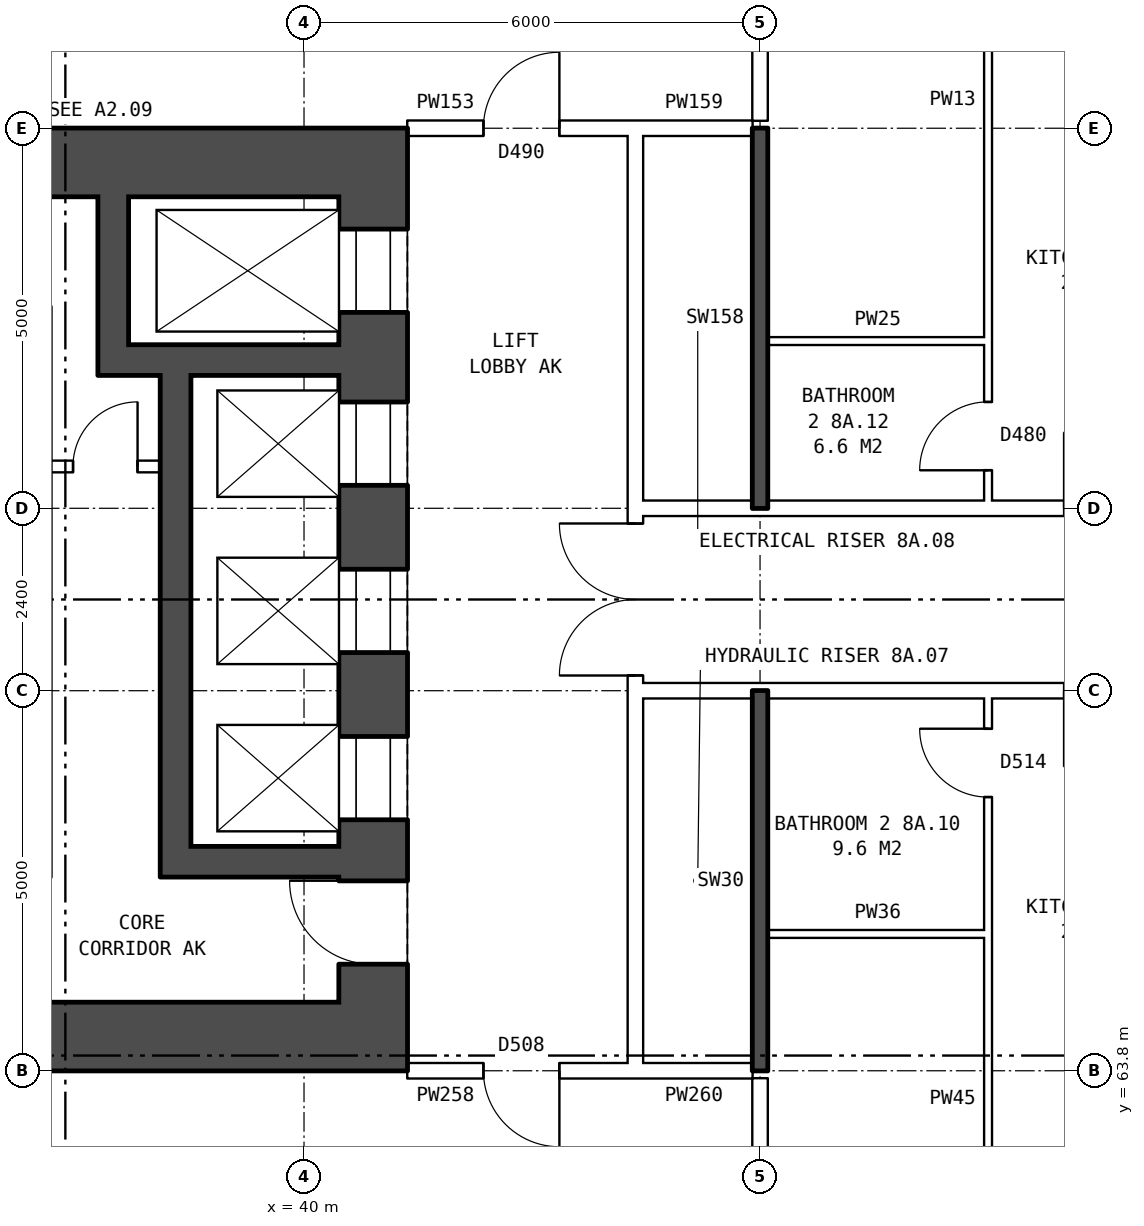
"""IFC4 building model, lengths in metres.
Left out: names, types, materials, properties, quantities, classifications, styles, units other than length and angle.
Written with IfcOpenShell. Run it as: python <this file> out.ifc"""

import sys

from ifc_helpers import new_model, si_unit, direction, frame, frame_2d, origin, place, context, subcontext, project, spatial, rectangle, extrude, element, fill, save


model = new_model("IFC4")
c1 = context("Model", 3, precision=1e-05, world=origin(), true_north=direction((0.0, 1.0)))
c2 = subcontext(c1, "Body", "Model", "MODEL_VIEW")
j1 = project(units=[si_unit("LENGTHUNIT", "METRE"), si_unit("PLANEANGLEUNIT", "RADIAN")], contexts=[c1])
p1 = place(None, origin())
s1 = spatial("IfcSite", under=j1, at=p1, CompositionType="ELEMENT")
p2 = place(p1, origin())
s2 = spatial("IfcBuilding", under=s1, at=p2, CompositionType="ELEMENT")
p3 = place(p2, frame((0.0, 0.0, 31.9)))
s3 = spatial("IfcBuildingStorey", under=s2, at=p3, CompositionType="ELEMENT", Elevation=31.9)
p4 = place(p3, frame((40.91, 75.3, 0.0), z_axis=(0.0, 0.0, 1.0), x_axis=(0.0, -1.0, 0.0)))
e1 = element("IfcWall", 1, at=p4, inside=s3, PredefinedType="SHEAR", context=c2, shape_type="SweptSolid", body=[
    extrude(rectangle(XDim=10.6, YDim=0.9, at=frame_2d((5.3, 0.0))), origin(), (0.0, 0.0, 1.0), 2.85),
])
p5 = place(p4, frame((0.425, 0.0, 0.0)))
e2 = element("IfcOpeningElement", 2, at=p5, cuts=e1, PredefinedType="OPENING", context=c2, shape_type="SweptSolid", body=[
    extrude(rectangle(XDim=1.1, YDim=2.1, at=frame_2d((0.55, 1.05))), frame((0.0, 0.46, 0.0), z_axis=(0.0, -1.0, 0.0), x_axis=(1.0, 0.0, 0.0)), (0.0, 0.0, 1.0), 0.92),
])
p6 = place(p4, frame((2.7, 0.0, 0.0)))
e3 = element("IfcOpeningElement", 3, at=p6, cuts=e1, PredefinedType="OPENING", context=c2, shape_type="SweptSolid", body=[
    extrude(rectangle(XDim=1.1, YDim=2.1, at=frame_2d((0.55, 1.05))), frame((0.0, 0.46, 0.0), z_axis=(0.0, -1.0, 0.0), x_axis=(1.0, 0.0, 0.0)), (0.0, 0.0, 1.0), 0.92),
])
p7 = place(p4, frame((4.9, 0.0, 0.0)))
e4 = element("IfcOpeningElement", 4, at=p7, cuts=e1, PredefinedType="OPENING", context=c2, shape_type="SweptSolid", body=[
    extrude(rectangle(XDim=1.1, YDim=2.1, at=frame_2d((0.55, 1.05))), frame((0.0, 0.46, 0.0), z_axis=(0.0, -1.0, 0.0), x_axis=(1.0, 0.0, 0.0)), (0.0, 0.0, 1.0), 0.92),
])
p8 = place(p4, frame((7.1, 0.0, 0.0)))
e5 = element("IfcOpeningElement", 5, at=p8, cuts=e1, PredefinedType="OPENING", context=c2, shape_type="SweptSolid", body=[
    extrude(rectangle(XDim=1.1, YDim=2.1, at=frame_2d((0.55, 1.05))), frame((0.0, 0.46, 0.0), z_axis=(0.0, -1.0, 0.0), x_axis=(1.0, 0.0, 0.0)), (0.0, 0.0, 1.0), 0.92),
])
p9 = place(p4, frame((9.0, 0.0, 0.0)))
e6 = element("IfcOpeningElement", 6, at=p9, cuts=e1, PredefinedType="OPENING", context=c2, shape_type="SweptSolid", body=[
    extrude(rectangle(XDim=1.1, YDim=2.1, at=frame_2d((0.55, 1.05))), frame((0.0, 0.46, 0.0), z_axis=(0.0, -1.0, 0.0), x_axis=(1.0, 0.0, 0.0)), (0.0, 0.0, 1.0), 0.92),
])
for number, where, z_axis, x_axis in (
    (7, (41.36, 75.75, 0.0), (0.0, 0.0, 1.0), (-1.0, 0.0, 0.0)),
    (8, (41.36, 64.25, 0.0), (0.0, 0.0, 1.0), (-1.0, 0.0, 0.0)),
):
    element("IfcWall", number, at=place(p3, frame(where, z_axis=z_axis, x_axis=x_axis)), inside=s3, PredefinedType="SHEAR", context=c2, shape_type="SweptSolid", body=[
        extrude(rectangle(XDim=9.0, YDim=0.9, at=frame_2d((4.5, 0.0))), origin(), (0.0, 0.0, 1.0), 2.85),
    ])
p10 = place(p3, frame((40.46, 73.15, 0.0), z_axis=(0.0, 0.0, 1.0), x_axis=(-1.0, 0.0, 0.0)))
e9 = element("IfcWall", 9, at=p10, inside=s3, PredefinedType="SHEAR", context=c2, shape_type="SweptSolid", body=[
    extrude(rectangle(XDim=3.17, YDim=0.4, at=frame_2d((1.585, 0.0))), origin(), (0.0, 0.0, 1.0), 2.85),
])
p11 = place(p3, frame((38.11, 71.75, 0.0), z_axis=(0.0, 0.0, 1.0), x_axis=(-1.0, 0.0, 0.0)))
e10 = element("IfcWall", 10, at=p11, inside=s3, PredefinedType="PARTITIONING", context=c2, shape_type="SweptSolid", body=[
    extrude(rectangle(XDim=1.45, YDim=0.15, at=frame_2d((0.725, 0.0))), origin(), (0.0, 0.0, 1.0), 2.85),
])
p12 = place(p11, frame((0.3, 0.0, 0.0)))
e11 = element("IfcOpeningElement", 11, at=p12, cuts=e10, PredefinedType="OPENING", context=c2, shape_type="SweptSolid", body=[
    extrude(rectangle(XDim=0.85, YDim=2.1, at=frame_2d((0.425, 1.05))), frame((0.0, 0.085, 0.0), z_axis=(0.0, -1.0, 0.0), x_axis=(1.0, 0.0, 0.0)), (0.0, 0.0, 1.0), 0.17),
])
p13 = place(p3, frame((40.46, 66.55, 0.0), z_axis=(0.0, 0.0, 1.0), x_axis=(-1.0, 0.0, 0.0)))
e12 = element("IfcWall", 12, at=p13, inside=s3, PredefinedType="SHEAR", context=c2, shape_type="SweptSolid", body=[
    extrude(rectangle(XDim=1.95, YDim=0.4, at=frame_2d((0.975, 0.0))), origin(), (0.0, 0.0, 1.0), 2.85),
])
p14 = place(p3, frame((38.31, 72.95, 0.0), z_axis=(0.0, 0.0, 1.0), x_axis=(0.0, -1.0, 0.0)))
e13 = element("IfcWall", 13, at=p14, inside=s3, PredefinedType="SHEAR", context=c2, shape_type="SweptSolid", body=[
    extrude(rectangle(XDim=6.6, YDim=0.4, at=frame_2d((3.3, 0.0))), origin(), (0.0, 0.0, 1.0), 2.85),
])
p15 = place(p3, frame((37.49, 75.3, 0.0), z_axis=(0.0, 0.0, 1.0), x_axis=(0.0, -1.0, 0.0)))
e14 = element("IfcWall", 14, at=p15, inside=s3, PredefinedType="SHEAR", context=c2, shape_type="SweptSolid", body=[
    extrude(rectangle(XDim=1.95, YDim=0.4, at=frame_2d((0.975, 0.0))), origin(), (0.0, 0.0, 1.0), 2.85),
])
p16 = place(p3, frame((44.36, 63.9, 0.0), z_axis=(0.0, 0.0, 1.0), x_axis=(0.0, 1.0, 0.0)))
e15 = element("IfcWall", 15, at=p16, inside=s3, PredefinedType="PARTITIONING", context=c2, shape_type="SweptSolid", body=[
    extrude(rectangle(XDim=12.2, YDim=0.2, at=frame_2d((6.1, 0.0))), origin(), (0.0, 0.0, 1.0), 2.85),
])
p17 = place(p16, frame((5.1, 0.0, 0.0)))
e16 = element("IfcOpeningElement", 16, at=p17, cuts=e15, PredefinedType="OPENING", context=c2, shape_type="SweptSolid", body=[
    extrude(rectangle(XDim=2.0, YDim=2.1, at=frame_2d((1.0, 1.05))), frame((0.0, 0.11, 0.0), z_axis=(0.0, -1.0, 0.0), x_axis=(1.0, 0.0, 0.0)), (0.0, 0.0, 1.0), 0.22),
])
p18 = place(p3, frame((41.36, 63.8, 0.0), z_axis=(0.0, 0.0, 1.0), x_axis=(1.0, 0.0, 0.0)))
e17 = element("IfcWall", 17, at=p18, inside=s3, PredefinedType="PARTITIONING", context=c2, shape_type="SweptSolid", body=[
    extrude(rectangle(XDim=3.0, YDim=0.2, at=frame_2d((1.5, 0.0))), origin(), (0.0, 0.0, 1.0), 2.85),
])
p19 = place(p18, frame((1.0, 0.0, 0.0)))
e18 = element("IfcOpeningElement", 18, at=p19, cuts=e17, PredefinedType="OPENING", context=c2, shape_type="SweptSolid", body=[
    extrude(rectangle(XDim=1.0, YDim=2.1, at=frame_2d((0.5, 1.05))), frame((0.0, 0.11, 0.0), z_axis=(0.0, -1.0, 0.0), x_axis=(1.0, 0.0, 0.0)), (0.0, 0.0, 1.0), 0.22),
])
p20 = place(p3, frame((44.36, 63.8, 0.0), z_axis=(0.0, 0.0, 1.0), x_axis=(1.0, 0.0, 0.0)))
e19 = element("IfcWall", 19, at=p20, inside=s3, PredefinedType="PARTITIONING", context=c2, shape_type="SweptSolid", body=[
    extrude(rectangle(XDim=1.54, YDim=0.2, at=frame_2d((0.77, 0.0))), origin(), (0.0, 0.0, 1.0), 2.85),
])
p21 = place(p3, frame((46.1, 65.6, 0.0), z_axis=(0.0, 0.0, 1.0), x_axis=(1.0, 0.0, 0.0)))
e20 = element("IfcWall", 20, at=p21, inside=s3, PredefinedType="PARTITIONING", context=c2, shape_type="SweptSolid", body=[
    extrude(rectangle(XDim=2.9, YDim=0.1, at=frame_2d((1.45, 0.0))), origin(), (0.0, 0.0, 1.0), 2.85),
])
p22 = place(p3, frame((44.36, 68.8, 0.0), z_axis=(0.0, 0.0, 1.0), x_axis=(1.0, 0.0, 0.0)))
e21 = element("IfcWall", 21, at=p22, inside=s3, PredefinedType="PARTITIONING", context=c2, shape_type="SweptSolid", body=[
    extrude(rectangle(XDim=19.28, YDim=0.2, at=frame_2d((9.64, 0.0))), origin(), (0.0, 0.0, 1.0), 2.85),
])
p23 = place(p22, frame((14.64, 0.0, 0.0)))
e22 = element("IfcOpeningElement", 22, at=p23, cuts=e21, PredefinedType="OPENING", context=c2, shape_type="SweptSolid", body=[
    extrude(rectangle(XDim=1.0, YDim=2.1, at=frame_2d((0.5, 1.05))), frame((0.0, 0.11, 0.0), z_axis=(0.0, -1.0, 0.0), x_axis=(1.0, 0.0, 0.0)), (0.0, 0.0, 1.0), 0.22),
])
p24 = place(p22, frame((5.64, 0.0, 0.0)))
e23 = element("IfcOpeningElement", 23, at=p24, cuts=e21, PredefinedType="OPENING", context=c2, shape_type="SweptSolid", body=[
    extrude(rectangle(XDim=1.0, YDim=2.1, at=frame_2d((0.5, 1.05))), frame((0.0, 0.11, 0.0), z_axis=(0.0, -1.0, 0.0), x_axis=(1.0, 0.0, 0.0)), (0.0, 0.0, 1.0), 0.22),
])
p25 = place(p3, frame((44.36, 71.2, 0.0), z_axis=(0.0, 0.0, 1.0), x_axis=(1.0, 0.0, 0.0)))
e24 = element("IfcWall", 24, at=p25, inside=s3, PredefinedType="PARTITIONING", context=c2, shape_type="SweptSolid", body=[
    extrude(rectangle(XDim=19.28, YDim=0.2, at=frame_2d((9.64, 0.0))), origin(), (0.0, 0.0, 1.0), 2.85),
])
p26 = place(p25, frame((14.64, 0.0, 0.0)))
e25 = element("IfcOpeningElement", 25, at=p26, cuts=e24, PredefinedType="OPENING", context=c2, shape_type="SweptSolid", body=[
    extrude(rectangle(XDim=1.0, YDim=2.1, at=frame_2d((0.5, 1.05))), frame((0.0, 0.11, 0.0), z_axis=(0.0, -1.0, 0.0), x_axis=(1.0, 0.0, 0.0)), (0.0, 0.0, 1.0), 0.22),
])
p27 = place(p25, frame((5.64, 0.0, 0.0)))
e26 = element("IfcOpeningElement", 26, at=p27, cuts=e24, PredefinedType="OPENING", context=c2, shape_type="SweptSolid", body=[
    extrude(rectangle(XDim=1.0, YDim=2.1, at=frame_2d((0.5, 1.05))), frame((0.0, 0.11, 0.0), z_axis=(0.0, -1.0, 0.0), x_axis=(1.0, 0.0, 0.0)), (0.0, 0.0, 1.0), 0.22),
])
p28 = place(p3, frame((46.1, 73.4, 0.0), z_axis=(0.0, 0.0, 1.0), x_axis=(1.0, 0.0, 0.0)))
e27 = element("IfcWall", 27, at=p28, inside=s3, PredefinedType="PARTITIONING", context=c2, shape_type="SweptSolid", body=[
    extrude(rectangle(XDim=2.9, YDim=0.1, at=frame_2d((1.45, 0.0))), origin(), (0.0, 0.0, 1.0), 2.85),
])
p29 = place(p3, frame((41.36, 76.2, 0.0), z_axis=(0.0, 0.0, 1.0), x_axis=(1.0, 0.0, 0.0)))
e28 = element("IfcWall", 28, at=p29, inside=s3, PredefinedType="PARTITIONING", context=c2, shape_type="SweptSolid", body=[
    extrude(rectangle(XDim=3.0, YDim=0.2, at=frame_2d((1.5, 0.0))), origin(), (0.0, 0.0, 1.0), 2.85),
])
p30 = place(p29, frame((1.0, 0.0, 0.0)))
e29 = element("IfcOpeningElement", 29, at=p30, cuts=e28, PredefinedType="OPENING", context=c2, shape_type="SweptSolid", body=[
    extrude(rectangle(XDim=1.0, YDim=2.1, at=frame_2d((0.5, 1.05))), frame((0.0, 0.11, 0.0), z_axis=(0.0, -1.0, 0.0), x_axis=(1.0, 0.0, 0.0)), (0.0, 0.0, 1.0), 0.22),
])
p31 = place(p3, frame((44.36, 76.2, 0.0), z_axis=(0.0, 0.0, 1.0), x_axis=(1.0, 0.0, 0.0)))
e30 = element("IfcWall", 30, at=p31, inside=s3, PredefinedType="PARTITIONING", context=c2, shape_type="SweptSolid", body=[
    extrude(rectangle(XDim=1.54, YDim=0.2, at=frame_2d((0.77, 0.0))), origin(), (0.0, 0.0, 1.0), 2.85),
])
p32 = place(p3, frame((46.0, 61.5, 0.0), z_axis=(0.0, 0.0, 1.0), x_axis=(0.0, 1.0, 0.0)))
e31 = element("IfcWall", 31, at=p32, inside=s3, PredefinedType="PARTITIONING", context=c2, shape_type="SweptSolid", body=[
    extrude(rectangle(XDim=2.2, YDim=0.2, at=frame_2d((1.1, 0.0))), origin(), (0.0, 0.0, 1.0), 2.85),
])
for number, where, z_axis, x_axis in (
    (32, (46.0, 63.8, 0.0), (0.0, 0.0, 1.0), (0.0, 1.0, 0.0)),
    (33, (46.0, 71.2, 0.0), (0.0, 0.0, 1.0), (0.0, 1.0, 0.0)),
):
    element("IfcWall", number, at=place(p3, frame(where, z_axis=z_axis, x_axis=x_axis)), inside=s3, PredefinedType="SOLIDWALL", context=c2, shape_type="SweptSolid", body=[
        extrude(rectangle(XDim=5.0, YDim=0.2, at=frame_2d((2.5, 0.0))), origin(), (0.0, 0.0, 1.0), 2.85),
    ])
p33 = place(p3, frame((46.0, 76.3, 0.0), z_axis=(0.0, 0.0, 1.0), x_axis=(0.0, 1.0, 0.0)))
e34 = element("IfcWall", 34, at=p33, inside=s3, PredefinedType="PARTITIONING", context=c2, shape_type="SweptSolid", body=[
    extrude(rectangle(XDim=2.2, YDim=0.2, at=frame_2d((1.1, 0.0))), origin(), (0.0, 0.0, 1.0), 2.85),
])
p34 = place(p3, frame((49.0, 54.36, 0.0), z_axis=(0.0, 0.0, 1.0), x_axis=(0.0, 1.0, 0.0)))
e35 = element("IfcWall", 35, at=p34, inside=s3, PredefinedType="PARTITIONING", context=c2, shape_type="SweptSolid", body=[
    extrude(rectangle(XDim=14.34, YDim=0.1, at=frame_2d((7.17, 0.0))), origin(), (0.0, 0.0, 1.0), 2.85),
])
p35 = place(p34, frame((4.2, 0.0, 0.0)))
e36 = element("IfcOpeningElement", 36, at=p35, cuts=e35, PredefinedType="OPENING", context=c2, shape_type="SweptSolid", body=[
    extrude(rectangle(XDim=0.9, YDim=2.1, at=frame_2d((0.45, 1.05))), frame((0.0, 0.06, 0.0), z_axis=(0.0, -1.0, 0.0), x_axis=(1.0, 0.0, 0.0)), (0.0, 0.0, 1.0), 0.12),
])
p36 = place(p34, frame((13.04, 0.0, 0.0)))
e37 = element("IfcOpeningElement", 37, at=p36, cuts=e35, PredefinedType="OPENING", context=c2, shape_type="SweptSolid", body=[
    extrude(rectangle(XDim=0.9, YDim=2.1, at=frame_2d((0.45, 1.05))), frame((0.0, 0.06, 0.0), z_axis=(0.0, -1.0, 0.0), x_axis=(1.0, 0.0, 0.0)), (0.0, 0.0, 1.0), 0.12),
])
p37 = place(p3, frame((49.0, 71.3, 0.0), z_axis=(0.0, 0.0, 1.0), x_axis=(0.0, 1.0, 0.0)))
e38 = element("IfcWall", 38, at=p37, inside=s3, PredefinedType="PARTITIONING", context=c2, shape_type="SweptSolid", body=[
    extrude(rectangle(XDim=14.34, YDim=0.1, at=frame_2d((7.17, 0.0))), origin(), (0.0, 0.0, 1.0), 2.85),
])
p38 = place(p37, frame((9.24, 0.0, 0.0)))
e39 = element("IfcOpeningElement", 39, at=p38, cuts=e38, PredefinedType="OPENING", context=c2, shape_type="SweptSolid", body=[
    extrude(rectangle(XDim=0.9, YDim=2.1, at=frame_2d((0.45, 1.05))), frame((0.0, 0.06, 0.0), z_axis=(0.0, -1.0, 0.0), x_axis=(1.0, 0.0, 0.0)), (0.0, 0.0, 1.0), 0.12),
])
p39 = place(p37, frame((0.4, 0.0, 0.0)))
e40 = element("IfcOpeningElement", 40, at=p39, cuts=e38, PredefinedType="OPENING", context=c2, shape_type="SweptSolid", body=[
    extrude(rectangle(XDim=0.9, YDim=2.1, at=frame_2d((0.45, 1.05))), frame((0.0, 0.06, 0.0), z_axis=(0.0, -1.0, 0.0), x_axis=(1.0, 0.0, 0.0)), (0.0, 0.0, 1.0), 0.12),
])
p40 = place(p5, origin())
e41 = element("IfcDoor", 41, at=p40, inside=s3, OperationType="DOUBLE_DOOR_SLIDING", PredefinedType="DOOR", context=c2, shape_type="SweptSolid", body=[
    extrude(rectangle(XDim=1.1, YDim=2.1, at=frame_2d((0.55, 1.05))), frame((0.0, -0.385, 0.0), z_axis=(0.0, -1.0, 0.0), x_axis=(1.0, 0.0, 0.0)), (0.0, 0.0, 1.0), 0.05),
])
fill(e2, e41)
p41 = place(p6, origin())
e42 = element("IfcDoor", 42, at=p41, inside=s3, OperationType="DOUBLE_DOOR_SLIDING", PredefinedType="DOOR", context=c2, shape_type="SweptSolid", body=[
    extrude(rectangle(XDim=1.1, YDim=2.1, at=frame_2d((0.55, 1.05))), frame((0.0, -0.385, 0.0), z_axis=(0.0, -1.0, 0.0), x_axis=(1.0, 0.0, 0.0)), (0.0, 0.0, 1.0), 0.05),
])
fill(e3, e42)
p42 = place(p7, origin())
e43 = element("IfcDoor", 43, at=p42, inside=s3, OperationType="DOUBLE_DOOR_SLIDING", PredefinedType="DOOR", context=c2, shape_type="SweptSolid", body=[
    extrude(rectangle(XDim=1.1, YDim=2.1, at=frame_2d((0.55, 1.05))), frame((0.0, -0.385, 0.0), z_axis=(0.0, -1.0, 0.0), x_axis=(1.0, 0.0, 0.0)), (0.0, 0.0, 1.0), 0.05),
])
fill(e4, e43)
p43 = place(p8, origin())
e44 = element("IfcDoor", 44, at=p43, inside=s3, OperationType="DOUBLE_DOOR_SLIDING", PredefinedType="DOOR", context=c2, shape_type="SweptSolid", body=[
    extrude(rectangle(XDim=1.1, YDim=2.1, at=frame_2d((0.55, 1.05))), frame((0.0, -0.385, 0.0), z_axis=(0.0, -1.0, 0.0), x_axis=(1.0, 0.0, 0.0)), (0.0, 0.0, 1.0), 0.05),
])
fill(e5, e44)
p44 = place(p9, frame((1.1, 0.0, 0.0), z_axis=(0.0, 0.0, 1.0), x_axis=(-1.0, 0.0, 0.0)))
e45 = element("IfcDoor", 45, at=p44, inside=s3, OperationType="SINGLE_SWING_RIGHT", PredefinedType="DOOR", context=c2, shape_type="SweptSolid", body=[
    extrude(rectangle(XDim=1.1, YDim=2.1, at=frame_2d((0.55, 1.05))), frame((0.0, 0.435, 0.0), z_axis=(0.0, -1.0, 0.0), x_axis=(1.0, 0.0, 0.0)), (0.0, 0.0, 1.0), 0.05),
])
fill(e6, e45)
p45 = place(p12, frame((0.85, 0.0, 0.0), z_axis=(0.0, 0.0, 1.0), x_axis=(-1.0, 0.0, 0.0)))
e46 = element("IfcDoor", 46, at=p45, inside=s3, OperationType="SINGLE_SWING_RIGHT", PredefinedType="DOOR", context=c2, shape_type="SweptSolid", body=[
    extrude(rectangle(XDim=0.85, YDim=2.1, at=frame_2d((0.425, 1.05))), frame((0.0, 0.025, 0.0), z_axis=(0.0, -1.0, 0.0), x_axis=(1.0, 0.0, 0.0)), (0.0, 0.0, 1.0), 0.05),
])
fill(e11, e46)
p46 = place(p17, origin())
e47 = element("IfcDoor", 47, at=p46, inside=s3, OperationType="DOUBLE_DOOR_SINGLE_SWING", PredefinedType="DOOR", context=c2, shape_type="SweptSolid", body=[
    extrude(rectangle(XDim=2.0, YDim=2.1, at=frame_2d((1.0, 1.05))), frame((0.0, 0.025, 0.0), z_axis=(0.0, -1.0, 0.0), x_axis=(1.0, 0.0, 0.0)), (0.0, 0.0, 1.0), 0.05),
])
fill(e16, e47)
p47 = place(p19, frame((1.0, 0.0, 0.0), z_axis=(0.0, 0.0, 1.0), x_axis=(-1.0, 0.0, 0.0)))
e48 = element("IfcDoor", 48, at=p47, inside=s3, OperationType="SINGLE_SWING_LEFT", PredefinedType="DOOR", context=c2, shape_type="SweptSolid", body=[
    extrude(rectangle(XDim=1.0, YDim=2.1, at=frame_2d((0.5, 1.05))), frame((0.0, 0.025, 0.0), z_axis=(0.0, -1.0, 0.0), x_axis=(1.0, 0.0, 0.0)), (0.0, 0.0, 1.0), 0.05),
])
fill(e18, e48)
p48 = place(p30, origin())
e49 = element("IfcDoor", 49, at=p48, inside=s3, OperationType="SINGLE_SWING_RIGHT", PredefinedType="DOOR", context=c2, shape_type="SweptSolid", body=[
    extrude(rectangle(XDim=1.0, YDim=2.1, at=frame_2d((0.5, 1.05))), frame((0.0, 0.025, 0.0), z_axis=(0.0, -1.0, 0.0), x_axis=(1.0, 0.0, 0.0)), (0.0, 0.0, 1.0), 0.05),
])
fill(e29, e49)
p49 = place(p36, origin())
e50 = element("IfcDoor", 50, at=p49, inside=s3, OperationType="SINGLE_SWING_RIGHT", PredefinedType="DOOR", context=c2, shape_type="SweptSolid", body=[
    extrude(rectangle(XDim=0.9, YDim=2.1, at=frame_2d((0.45, 1.05))), frame((0.0, 0.025, 0.0), z_axis=(0.0, -1.0, 0.0), x_axis=(1.0, 0.0, 0.0)), (0.0, 0.0, 1.0), 0.05),
])
fill(e37, e50)
p50 = place(p39, origin())
e51 = element("IfcDoor", 51, at=p50, inside=s3, OperationType="SINGLE_SWING_LEFT", PredefinedType="DOOR", context=c2, shape_type="SweptSolid", body=[
    extrude(rectangle(XDim=0.9, YDim=2.1, at=frame_2d((0.45, 1.05))), frame((0.0, 0.025, 0.0), z_axis=(0.0, -1.0, 0.0), x_axis=(1.0, 0.0, 0.0)), (0.0, 0.0, 1.0), 0.05),
])
fill(e40, e51)
save(model, sys.argv[1])
